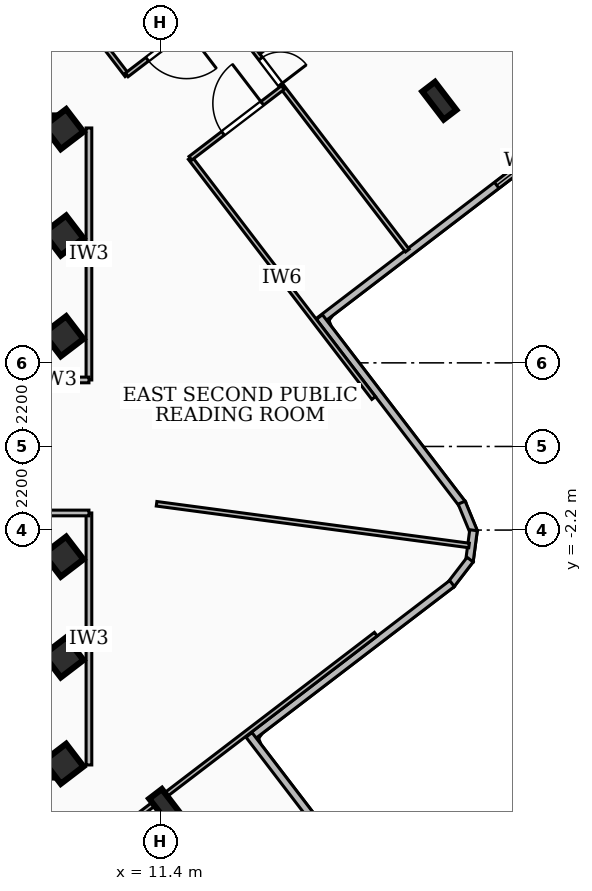
"""IFC4 building model, lengths in metres.
Left out: names, types, materials, properties, quantities, classifications, styles, units other than length and angle.
Written with IfcOpenShell. Run it as: python <this file> out.ifc"""

import sys

from ifc_helpers import new_model, si_unit, direction, frame, frame_2d, origin, origin_2d, place, context, subcontext, project, spatial, rectangle, i_section, extrude, element, fill, save


model = new_model("IFC4")
c1 = context("Model", 3, precision=1e-05, world=origin(), true_north=direction((0.0, 1.0)))
c2 = subcontext(c1, "Body", "Model", "MODEL_VIEW")
j1 = project(units=[si_unit("LENGTHUNIT", "METRE"), si_unit("PLANEANGLEUNIT", "RADIAN")], contexts=[c1])
p1 = place(None, origin())
s1 = spatial("IfcSite", under=j1, at=p1, CompositionType="ELEMENT")
p2 = place(p1, origin())
s2 = spatial("IfcBuilding", under=s1, at=p2, CompositionType="ELEMENT")
p3 = place(p2, frame((0.0, 0.0, 232.56)))
s3 = spatial("IfcBuildingStorey", under=s2, at=p3, CompositionType="ELEMENT", Elevation=232.56)
for number, where, z_axis, x_axis in (
    (1, (-8.78, 8.51, 0.0), (0.0, 0.0, 1.0), (1.0, 0.0, 0.0)),
    (2, (8.78, -8.51, 0.0), (0.0, 0.0, 1.0), (-1.0, 0.0, 0.0)),
):
    element("IfcWall", number, at=place(p3, frame(where, z_axis=z_axis, x_axis=x_axis)), inside=s3, PredefinedType="SHEAR", context=c2, shape_type="SweptSolid", body=[
        extrude(rectangle(XDim=17.56, YDim=0.4, at=frame_2d((8.78, 0.0))), origin(), (0.0, 0.0, 1.0), 3.14),
    ])
for number, where, z_axis, x_axis in (
    (3, (8.85, -5.55, 0.0), (0.0, 0.0, 1.0), (0.794, 0.607, 0.0)),
    (4, (8.85, -2.9, 0.0), (0.0, 0.0, 1.0), (0.794, 0.607, 0.0)),
    (5, (8.85, 2.9, 0.0), (0.0, 0.0, 1.0), (0.794, 0.607, 0.0)),
    (6, (8.85, 5.55, 0.0), (0.0, 0.0, 1.0), (0.794, 0.607, 0.0)),
    (7, (8.85, -8.35, 0.0), (0.0, 0.0, 1.0), (0.794, 0.607, 0.0)),
    (8, (8.85, 8.35, 0.0), (0.0, 0.0, 1.0), (0.794, 0.607, 0.0)),
):
    element("IfcColumn", number, at=place(p3, frame(where, z_axis=z_axis, x_axis=x_axis)), inside=s3, PredefinedType="COLUMN", context=c2, shape_type="SweptSolid", body=[
        extrude(rectangle(XDim=0.75, YDim=0.75, at=origin_2d()), origin(), (0.0, 0.0, 1.0), 3.42),
    ])
for number, where, z_axis, x_axis in (
    (9, (18.741, 9.097, 0.0), (0.0, 0.0, 1.0), (0.794, 0.607, 0.0)),
    (10, (11.554, -9.51, 0.0), (0.0, 0.0, 1.0), (0.794, 0.607, 0.0)),
):
    element("IfcColumn", number, at=place(p3, frame(where, z_axis=z_axis, x_axis=x_axis)), inside=s3, PredefinedType="COLUMN", context=c2, shape_type="SweptSolid", body=[
        extrude(i_section(OverallWidth=0.418, OverallDepth=0.927, WebThickness=0.019, FlangeThickness=0.032, at=origin_2d()), origin(), (0.0, 0.0, 1.0), 3.42),
    ])
p4 = place(p3, frame((22.594, 8.664, 0.0), z_axis=(0.0, 0.0, 1.0), x_axis=(-0.794406416539, -0.607386569954, 0.0)))
e11 = element("IfcWall", 11, at=p4, inside=s3, PredefinedType="SOLIDWALL", context=c2, shape_type="SweptSolid", body=[
    extrude(rectangle(XDim=8.843, YDim=0.2, at=frame_2d((4.421, 0.0))), origin(), (0.0, 0.0, 1.0), 3.14),
])
p5 = place(p4, frame((0.85, 0.0, 0.85)))
e12 = element("IfcOpeningElement", 12, at=p5, cuts=e11, PredefinedType="OPENING", context=c2, shape_type="SweptSolid", body=[
    extrude(rectangle(XDim=2.1, YDim=2.0, at=frame_2d((1.05, 1.0))), frame((0.0, 0.11, 0.0), z_axis=(0.0, -1.0, 0.0), x_axis=(1.0, 0.0, 0.0)), (0.0, 0.0, 1.0), 0.22),
])
p6 = place(p3, frame((15.584, 3.406, 0.0), z_axis=(0.0, 0.0, 1.0), x_axis=(0.60748663121, -0.794329901805, 0.0)))
e13 = element("IfcWall", 13, at=p6, inside=s3, PredefinedType="SOLIDWALL", context=c2, shape_type="SweptSolid", body=[
    extrude(rectangle(XDim=6.203, YDim=0.2, at=frame_2d((3.101, 0.0))), origin(), (0.0, 0.0, 1.0), 3.14),
])
p7 = place(p3, frame((19.327, -1.478, 0.0), z_axis=(0.0, 0.0, 1.0), x_axis=(0.382171551451, -0.924091394431, 0.0)))
e14 = element("IfcWall", 14, at=p7, inside=s3, PredefinedType="SOLIDWALL", context=c2, shape_type="SweptSolid", body=[
    extrude(rectangle(XDim=0.837, YDim=0.2, at=frame_2d((0.419, 0.0))), origin(), (0.0, 0.0, 1.0), 3.14),
])
p8 = place(p3, frame((19.64, -2.204, 0.0), z_axis=(0.0, 0.0, 1.0), x_axis=(-0.130806653943, -0.99140789753, 0.0)))
e15 = element("IfcWall", 15, at=p8, inside=s3, PredefinedType="SOLIDWALL", context=c2, shape_type="SweptSolid", body=[
    extrude(rectangle(XDim=0.825, YDim=0.2, at=frame_2d((0.413, 0.0))), origin(), (0.0, 0.0, 1.0), 3.14),
])
p9 = place(p3, frame((19.55, -2.977, 0.0), z_axis=(0.0, 0.0, 1.0), x_axis=(-0.609274558022, -0.792959338773, 0.0)))
e16 = element("IfcWall", 16, at=p9, inside=s3, PredefinedType="SOLIDWALL", context=c2, shape_type="SweptSolid", body=[
    extrude(rectangle(XDim=0.839, YDim=0.2, at=frame_2d((0.419, 0.0))), origin(), (0.0, 0.0, 1.0), 3.14),
])
p10 = place(p3, frame((19.074, -3.607, 0.0), z_axis=(0.0, 0.0, 1.0), x_axis=(-0.794465731546, -0.607308983466, 0.0)))
e17 = element("IfcWall", 17, at=p10, inside=s3, PredefinedType="SOLIDWALL", context=c2, shape_type="SweptSolid", body=[
    extrude(rectangle(XDim=6.743, YDim=0.2, at=frame_2d((3.372, 0.0))), origin(), (0.0, 0.0, 1.0), 3.14),
])
p11 = place(p3, frame((13.732, -7.589, 0.0), z_axis=(0.0, 0.0, 1.0), x_axis=(0.607428636372, -0.794374251669, 0.0)))
e18 = element("IfcWall", 18, at=p11, inside=s3, PredefinedType="SOLIDWALL", context=c2, shape_type="SweptSolid", body=[
    extrude(rectangle(XDim=4.643, YDim=0.2, at=frame_2d((2.321, 0.0))), origin(), (0.0, 0.0, 1.0), 3.14),
])
p12 = place(p3, frame((9.52, 1.75, 0.0), z_axis=(0.0, 0.0, 1.0), x_axis=(0.0, 1.0, 0.0)))
e19 = element("IfcWall", 19, at=p12, inside=s3, PredefinedType="PARTITIONING", context=c2, shape_type="SweptSolid", body=[
    extrude(rectangle(XDim=6.63, YDim=0.15, at=frame_2d((3.315, 0.0))), origin(), (0.0, 0.0, 1.0), 2.51),
])
p13 = place(p3, frame((7.85, 1.75, 0.0), z_axis=(0.0, 0.0, 1.0), x_axis=(1.0, 0.0, 0.0)))
e20 = element("IfcWall", 20, at=p13, inside=s3, PredefinedType="PARTITIONING", context=c2, shape_type="SweptSolid", body=[
    extrude(rectangle(XDim=1.67, YDim=0.15, at=frame_2d((0.835, 0.0))), origin(), (0.0, 0.0, 1.0), 2.37),
])
p14 = place(p3, frame((9.52, -8.38, 0.0), z_axis=(0.0, 0.0, 1.0), x_axis=(0.0, 1.0, 0.0)))
e21 = element("IfcWall", 21, at=p14, inside=s3, PredefinedType="PARTITIONING", context=c2, shape_type="SweptSolid", body=[
    extrude(rectangle(XDim=6.63, YDim=0.15, at=frame_2d((3.315, 0.0))), origin(), (0.0, 0.0, 1.0), 3.14),
])
p15 = place(p3, frame((7.85, -1.75, 0.0), z_axis=(0.0, 0.0, 1.0), x_axis=(1.0, 0.0, 0.0)))
e22 = element("IfcWall", 22, at=p15, inside=s3, PredefinedType="PARTITIONING", context=c2, shape_type="SweptSolid", body=[
    extrude(rectangle(XDim=1.67, YDim=0.15, at=frame_2d((0.835, 0.0))), origin(), (0.0, 0.0, 1.0), 2.37),
])
p16 = place(p3, frame((11.3, -1.508, 0.0), z_axis=(0.0, 0.0, 1.0), x_axis=(0.99121735818, -0.132242764804, 0.0)))
e23 = element("IfcWall", 23, at=p16, inside=s3, PredefinedType="PARTITIONING", context=c2, shape_type="SweptSolid", body=[
    extrude(rectangle(XDim=8.295, YDim=0.12, at=frame_2d((4.147, 0.0))), origin(), (0.0, 0.0, 1.0), 3.14),
])
p17 = place(p3, frame((10.52, 9.768, 0.0), z_axis=(0.0, 0.0, 1.0), x_axis=(-0.607441568234, 0.794364362985, 0.0)))
e24 = element("IfcWall", 24, at=p17, inside=s3, PredefinedType="PARTITIONING", context=c2, shape_type="SweptSolid", body=[
    extrude(rectangle(XDim=8.49, YDim=0.12, at=frame_2d((4.245, 0.0))), origin(), (0.0, 0.0, 1.0), 2.51),
])
p18 = place(p3, frame((17.012, 1.275, 0.0), z_axis=(0.0, 0.0, 1.0), x_axis=(-0.60728139249, 0.794486822003, 0.0)))
e25 = element("IfcWall", 25, at=p18, inside=s3, PredefinedType="PARTITIONING", context=c2, shape_type="SweptSolid", body=[
    extrude(rectangle(XDim=7.95, YDim=0.12, at=frame_2d((3.975, 0.0))), origin(), (0.0, 0.0, 1.0), 3.14),
])
p19 = place(p3, frame((12.945, 11.634, 0.0), z_axis=(0.0, 0.0, 1.0), x_axis=(-0.794509541066, -0.607251668714, 0.0)))
e26 = element("IfcWall", 26, at=p19, inside=s3, PredefinedType="PARTITIONING", context=c2, shape_type="SweptSolid", body=[
    extrude(rectangle(XDim=3.06, YDim=0.12, at=frame_2d((1.53, 0.0))), origin(), (0.0, 0.0, 1.0), 2.51),
])
p20 = place(p19, frame((1.08, 0.0, 0.0)))
e27 = element("IfcOpeningElement", 27, at=p20, cuts=e26, PredefinedType="OPENING", context=c2, shape_type="SweptSolid", body=[
    extrude(rectangle(XDim=1.3, YDim=2.1, at=frame_2d((0.65, 1.05))), frame((0.0, 0.07, 0.0), z_axis=(0.0, -1.0, 0.0), x_axis=(1.0, 0.0, 0.0)), (0.0, 0.0, 1.0), 0.14),
])
p21 = place(p3, frame((12.19, 7.583, 0.0), z_axis=(0.0, 0.0, 1.0), x_axis=(0.794394061013, 0.607402729519, 0.0)))
e28 = element("IfcWall", 28, at=p21, inside=s3, PredefinedType="PARTITIONING", context=c2, shape_type="SweptSolid", body=[
    extrude(rectangle(XDim=3.06, YDim=0.12, at=frame_2d((1.53, 0.0))), origin(), (0.0, 0.0, 1.0), 2.51),
])
p22 = place(p21, frame((1.08, 0.0, 0.0)))
e29 = element("IfcOpeningElement", 29, at=p22, cuts=e28, PredefinedType="OPENING", context=c2, shape_type="SweptSolid", body=[
    extrude(rectangle(XDim=1.3, YDim=2.1, at=frame_2d((0.65, 1.05))), frame((0.0, 0.07, 0.0), z_axis=(0.0, -1.0, 0.0), x_axis=(1.0, 0.0, 0.0)), (0.0, 0.0, 1.0), 0.14),
])
p23 = place(p3, frame((13.983, 10.376, 0.0), z_axis=(0.0, 0.0, 1.0), x_axis=(0.794405792036, 0.607387386747, 0.0)))
e30 = element("IfcWall", 30, at=p23, inside=s3, PredefinedType="PARTITIONING", context=c2, shape_type="SweptSolid", body=[
    extrude(rectangle(XDim=7.224, YDim=0.12, at=frame_2d((3.612, 0.0))), origin(), (0.0, 0.0, 1.0), 3.14),
])
p24 = place(p3, frame((9.996, 15.491, 0.0), z_axis=(0.0, 0.0, 1.0), x_axis=(0.607384628916, -0.794407900613, 0.0)))
e31 = element("IfcWall", 31, at=p24, inside=s3, PredefinedType="PARTITIONING", context=c2, shape_type="SweptSolid", body=[
    extrude(rectangle(XDim=13.01, YDim=0.12, at=frame_2d((6.505, 0.0))), origin(), (0.0, 0.0, 1.0), 2.51),
])
p25 = place(p24, frame((6.655, 0.0, 0.0)))
e32 = element("IfcOpeningElement", 32, at=p25, cuts=e31, PredefinedType="OPENING", context=c2, shape_type="SweptSolid", body=[
    extrude(rectangle(XDim=0.86, YDim=2.04, at=frame_2d((0.43, 1.02))), frame((0.0, 0.07, 0.0), z_axis=(0.0, -1.0, 0.0), x_axis=(1.0, 0.0, 0.0)), (0.0, 0.0, 1.0), 0.14),
])
p26 = place(p24, frame((5.455, 0.0, 0.0)))
e33 = element("IfcOpeningElement", 33, at=p26, cuts=e31, PredefinedType="OPENING", context=c2, shape_type="SweptSolid", body=[
    extrude(rectangle(XDim=0.86, YDim=2.04, at=frame_2d((0.43, 1.02))), frame((0.0, 0.07, 0.0), z_axis=(0.0, -1.0, 0.0), x_axis=(1.0, 0.0, 0.0)), (0.0, 0.0, 1.0), 0.14),
])
p27 = place(p3, frame((17.068, -4.939, 0.0), z_axis=(0.0, 0.0, 1.0), x_axis=(-0.794433927634, -0.607350586255, 0.0)))
e34 = element("IfcWall", 34, at=p27, inside=s3, PredefinedType="PARTITIONING", context=c2, shape_type="SweptSolid", body=[
    extrude(rectangle(XDim=20.58, YDim=0.12, at=frame_2d((10.29, 0.0))), origin(), (0.0, 0.0, 1.0), 2.51),
])
p28 = place(p27, frame((9.96, 0.0, 0.0)))
e35 = element("IfcOpeningElement", 35, at=p28, cuts=e34, PredefinedType="OPENING", context=c2, shape_type="SweptSolid", body=[
    extrude(rectangle(XDim=1.2, YDim=2.1, at=frame_2d((0.6, 1.05))), frame((0.0, 0.07, 0.0), z_axis=(0.0, -1.0, 0.0), x_axis=(1.0, 0.0, 0.0)), (0.0, 0.0, 1.0), 0.14),
])
p29 = place(p5, origin())
e36 = element("IfcWindow", 36, at=p29, inside=s3, PartitioningType="SINGLE_PANEL", PredefinedType="WINDOW", context=c2, shape_type="SweptSolid", body=[
    extrude(rectangle(XDim=2.1, YDim=2.0, at=frame_2d((1.05, 1.0))), frame((0.0, 0.03, 0.0), z_axis=(0.0, -1.0, 0.0), x_axis=(1.0, 0.0, 0.0)), (0.0, 0.0, 1.0), 0.06),
])
fill(e12, e36)
p30 = place(p20, origin())
e37 = element("IfcDoor", 37, at=p30, inside=s3, OperationType="SINGLE_SWING_LEFT", PredefinedType="DOOR", context=c2, shape_type="SweptSolid", body=[
    extrude(rectangle(XDim=1.3, YDim=2.1, at=frame_2d((0.65, 1.05))), frame((0.0, 0.025, 0.0), z_axis=(0.0, -1.0, 0.0), x_axis=(1.0, 0.0, 0.0)), (0.0, 0.0, 1.0), 0.05),
])
fill(e27, e37)
p31 = place(p22, origin())
e38 = element("IfcDoor", 38, at=p31, inside=s3, OperationType="SINGLE_SWING_RIGHT", PredefinedType="DOOR", context=c2, shape_type="SweptSolid", body=[
    extrude(rectangle(XDim=1.3, YDim=2.1, at=frame_2d((0.65, 1.05))), frame((0.0, 0.025, 0.0), z_axis=(0.0, -1.0, 0.0), x_axis=(1.0, 0.0, 0.0)), (0.0, 0.0, 1.0), 0.05),
])
fill(e29, e38)
p32 = place(p25, origin())
e39 = element("IfcDoor", 39, at=p32, inside=s3, OperationType="SINGLE_SWING_RIGHT", PredefinedType="DOOR", context=c2, shape_type="SweptSolid", body=[
    extrude(rectangle(XDim=0.86, YDim=2.04, at=frame_2d((0.43, 1.02))), frame((0.0, 0.025, 0.0), z_axis=(0.0, -1.0, 0.0), x_axis=(1.0, 0.0, 0.0)), (0.0, 0.0, 1.0), 0.05),
])
fill(e32, e39)
save(model, sys.argv[1])
